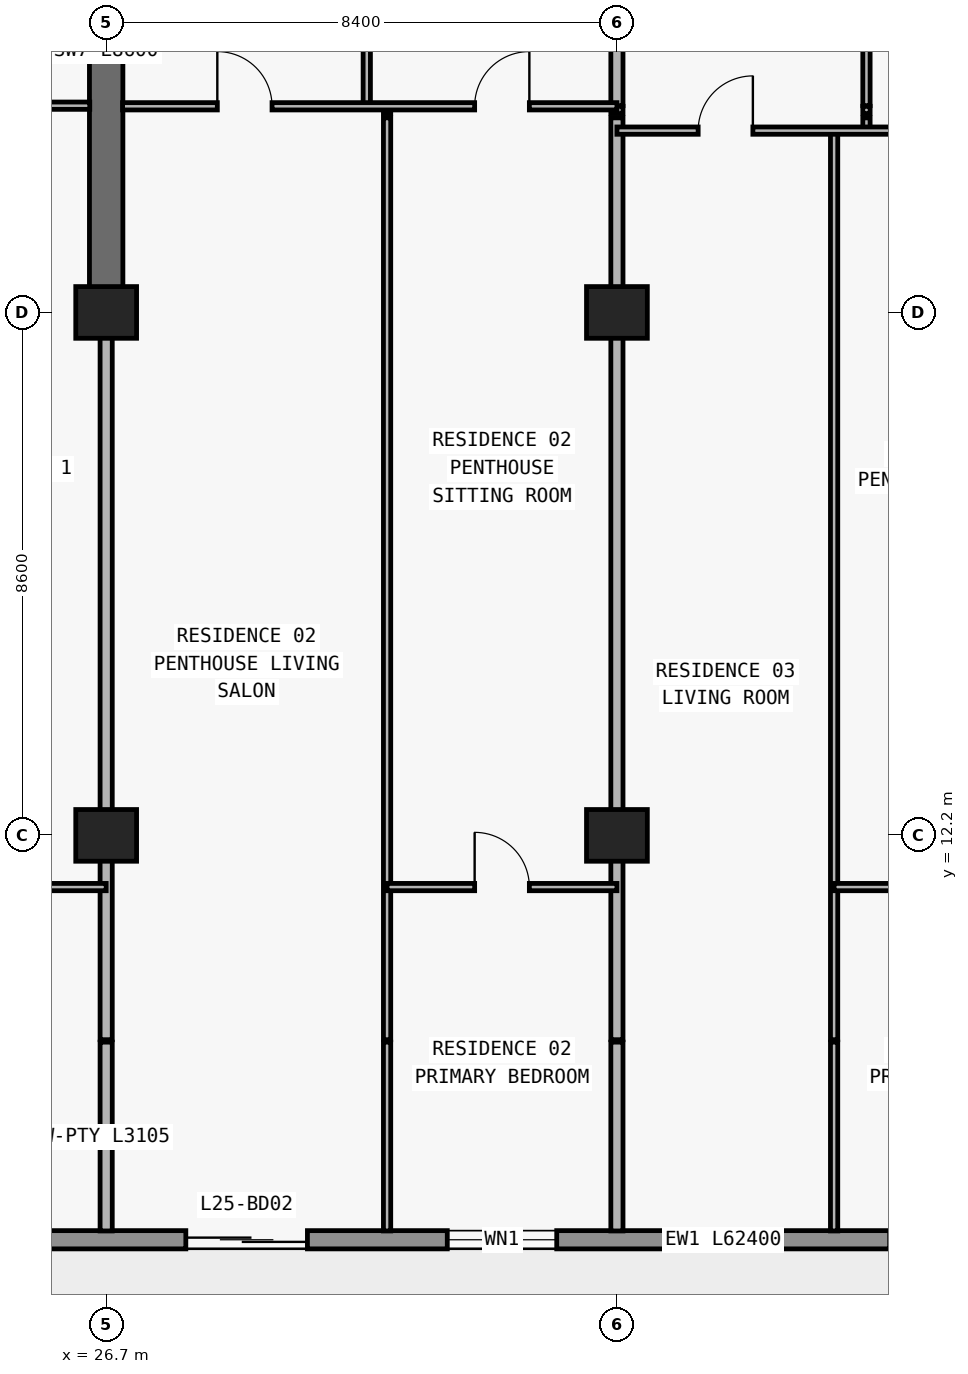
"""IFC4 building model, lengths in metres.
Left out: names, types, materials, properties, quantities, classifications, styles, units other than length and angle.
Written with IfcOpenShell. Run it as: python <this file> out.ifc"""

import sys

from ifc_helpers import new_model, si_unit, direction, frame, frame_2d, origin, origin_2d, place, context, subcontext, project, spatial, rectangle, extrude, element, fill, save


model = new_model("IFC4")
c1 = context("Model", 3, precision=1e-05, world=origin(), true_north=direction((0.0, 1.0)))
c2 = subcontext(c1, "Body", "Model", "MODEL_VIEW")
j1 = project(units=[si_unit("LENGTHUNIT", "METRE"), si_unit("PLANEANGLEUNIT", "RADIAN")], contexts=[c1])
p1 = place(None, origin())
s1 = spatial("IfcSite", under=j1, at=p1, CompositionType="ELEMENT")
p2 = place(p1, origin())
s2 = spatial("IfcBuilding", under=s1, at=p2, CompositionType="ELEMENT")
p3 = place(p2, frame((0.0, 0.0, 94.5)))
s3 = spatial("IfcBuildingStorey", under=s2, at=p3, CompositionType="ELEMENT", Elevation=94.5)
for number, where, z_axis, x_axis in (
    (1, (26.7, 12.2, 0.0), (0.0, 0.0, 1.0), (1.0, 0.0, 0.0)),
    (2, (35.1, 12.2, 0.0), (0.0, 0.0, 1.0), (1.0, 0.0, 0.0)),
    (3, (26.7, 20.8, 0.0), (0.0, 0.0, 1.0), (1.0, 0.0, 0.0)),
    (4, (35.1, 20.8, 0.0), (0.0, 0.0, 1.0), (1.0, 0.0, 0.0)),
):
    element("IfcColumn", number, at=place(p3, frame(where, z_axis=z_axis, x_axis=x_axis)), inside=s3, PredefinedType="COLUMN", context=c2, shape_type="SweptSolid", body=[
        extrude(rectangle(XDim=1.0, YDim=0.85, at=origin_2d()), origin(), (0.0, 0.0, 1.0), 3.0),
    ])
p4 = place(p3, frame((26.7, 20.8, 0.0), z_axis=(0.0, 0.0, 1.0), x_axis=(0.0, 1.0, 0.0)))
e5 = element("IfcWall", 5, at=p4, inside=s3, PredefinedType="SHEAR", context=c2, shape_type="SweptSolid", body=[
    extrude(rectangle(XDim=8.6, YDim=0.55, at=frame_2d((4.3, 0.0))), origin(), (0.0, 0.0, 1.0), 3.0),
])
p5 = place(p3, frame((70.1, 5.55, 0.0), z_axis=(0.0, 0.0, 1.0), x_axis=(-1.0, 0.0, 0.0)))
e6 = element("IfcWall", 6, at=p5, inside=s3, PredefinedType="STANDARD", context=c2, shape_type="SweptSolid", body=[
    extrude(rectangle(XDim=62.4, YDim=0.3, at=frame_2d((31.2, 0.0))), origin(), (0.0, 0.0, 1.0), 3.0),
])
p6 = place(p5, frame((57.29, 0.0, 0.0)))
e7 = element("IfcOpeningElement", 7, at=p6, cuts=e6, PredefinedType="OPENING", context=c2, shape_type="SweptSolid", body=[
    extrude(rectangle(XDim=2.0, YDim=2.3, at=frame_2d((1.0, 1.15))), frame((0.0, 0.16, 0.0), z_axis=(0.0, -1.0, 0.0), x_axis=(1.0, 0.0, 0.0)), (0.0, 0.0, 1.0), 0.32),
])
p7 = place(p5, frame((52.61, 0.0, 0.65)))
e8 = element("IfcOpeningElement", 8, at=p7, cuts=e6, PredefinedType="OPENING", context=c2, shape_type="SweptSolid", body=[
    extrude(rectangle(XDim=2.6, YDim=1.85, at=frame_2d((1.3, 0.925))), frame((0.0, 0.16, 0.0), z_axis=(0.0, -1.0, 0.0), x_axis=(1.0, 0.0, 0.0)), (0.0, 0.0, 1.0), 0.32),
])
p8 = place(p5, frame((46.5, 0.0, 0.85)))
e9 = element("IfcOpeningElement", 9, at=p8, cuts=e6, PredefinedType="OPENING", context=c2, shape_type="SweptSolid", body=[
    extrude(rectangle(XDim=2.2, YDim=1.55, at=frame_2d((1.1, 0.775))), frame((0.0, 0.16, 0.0), z_axis=(0.0, -1.0, 0.0), x_axis=(1.0, 0.0, 0.0)), (0.0, 0.0, 1.0), 0.32),
])
p9 = place(p5, frame((40.09, 0.0, 0.0)))
e10 = element("IfcOpeningElement", 10, at=p9, cuts=e6, PredefinedType="OPENING", context=c2, shape_type="SweptSolid", body=[
    extrude(rectangle(XDim=2.0, YDim=2.3, at=frame_2d((1.0, 1.15))), frame((0.0, 0.16, 0.0), z_axis=(0.0, -1.0, 0.0), x_axis=(1.0, 0.0, 0.0)), (0.0, 0.0, 1.0), 0.32),
])
p10 = place(p5, frame((35.99, 0.0, 0.85)))
e11 = element("IfcOpeningElement", 11, at=p10, cuts=e6, PredefinedType="OPENING", context=c2, shape_type="SweptSolid", body=[
    extrude(rectangle(XDim=1.8, YDim=1.55, at=frame_2d((0.9, 0.775))), frame((0.0, 0.16, 0.0), z_axis=(0.0, -1.0, 0.0), x_axis=(1.0, 0.0, 0.0)), (0.0, 0.0, 1.0), 0.32),
])
p11 = place(p5, frame((28.314, 0.0, 0.85)))
e12 = element("IfcOpeningElement", 12, at=p11, cuts=e6, PredefinedType="OPENING", context=c2, shape_type="SweptSolid", body=[
    extrude(rectangle(XDim=2.2, YDim=1.55, at=frame_2d((1.1, 0.775))), frame((0.0, 0.16, 0.0), z_axis=(0.0, -1.0, 0.0), x_axis=(1.0, 0.0, 0.0)), (0.0, 0.0, 1.0), 0.32),
])
p12 = place(p5, frame((24.09, 0.0, 0.0)))
e13 = element("IfcOpeningElement", 13, at=p12, cuts=e6, PredefinedType="OPENING", context=c2, shape_type="SweptSolid", body=[
    extrude(rectangle(XDim=2.0, YDim=2.3, at=frame_2d((1.0, 1.15))), frame((0.0, 0.16, 0.0), z_axis=(0.0, -1.0, 0.0), x_axis=(1.0, 0.0, 0.0)), (0.0, 0.0, 1.0), 0.32),
])
p13 = place(p5, frame((19.99, 0.0, 0.85)))
e14 = element("IfcOpeningElement", 14, at=p13, cuts=e6, PredefinedType="OPENING", context=c2, shape_type="SweptSolid", body=[
    extrude(rectangle(XDim=1.8, YDim=1.55, at=frame_2d((0.9, 0.775))), frame((0.0, 0.16, 0.0), z_axis=(0.0, -1.0, 0.0), x_axis=(1.0, 0.0, 0.0)), (0.0, 0.0, 1.0), 0.32),
])
p14 = place(p5, frame((16.09, 0.0, 0.0)))
e15 = element("IfcOpeningElement", 15, at=p14, cuts=e6, PredefinedType="OPENING", context=c2, shape_type="SweptSolid", body=[
    extrude(rectangle(XDim=2.0, YDim=2.3, at=frame_2d((1.0, 1.15))), frame((0.0, 0.16, 0.0), z_axis=(0.0, -1.0, 0.0), x_axis=(1.0, 0.0, 0.0)), (0.0, 0.0, 1.0), 0.32),
])
p15 = place(p5, frame((11.41, 0.0, 0.65)))
e16 = element("IfcOpeningElement", 16, at=p15, cuts=e6, PredefinedType="OPENING", context=c2, shape_type="SweptSolid", body=[
    extrude(rectangle(XDim=2.6, YDim=1.85, at=frame_2d((1.3, 0.925))), frame((0.0, 0.16, 0.0), z_axis=(0.0, -1.0, 0.0), x_axis=(1.0, 0.0, 0.0)), (0.0, 0.0, 1.0), 0.32),
])
p16 = place(p5, frame((5.3, 0.0, 0.85)))
e17 = element("IfcOpeningElement", 17, at=p16, cuts=e6, PredefinedType="OPENING", context=c2, shape_type="SweptSolid", body=[
    extrude(rectangle(XDim=2.2, YDim=1.55, at=frame_2d((1.1, 0.775))), frame((0.0, 0.16, 0.0), z_axis=(0.0, -1.0, 0.0), x_axis=(1.0, 0.0, 0.0)), (0.0, 0.0, 1.0), 0.32),
])
p17 = place(p3, frame((26.7, 5.695, 0.0), z_axis=(0.0, 0.0, 1.0), x_axis=(0.0, 1.0, 0.0)))
e18 = element("IfcWall", 18, at=p17, inside=s3, PredefinedType="PARTITIONING", context=c2, shape_type="SweptSolid", body=[
    extrude(rectangle(XDim=3.105, YDim=0.2, at=frame_2d((1.552, 0.0))), origin(), (0.0, 0.0, 1.0), 3.0),
])
p18 = place(p3, frame((26.7, 8.84, 0.0), z_axis=(0.0, 0.0, 1.0), x_axis=(0.0, 1.0, 0.0)))
e19 = element("IfcWall", 19, at=p18, inside=s3, PredefinedType="PARTITIONING", context=c2, shape_type="SweptSolid", body=[
    extrude(rectangle(XDim=11.955, YDim=0.2, at=frame_2d((5.978, 0.0))), origin(), (0.0, 0.0, 1.0), 2.124),
])
p19 = place(p3, frame((30.986, 24.2, 0.0), z_axis=(0.0, 0.0, 1.0), x_axis=(0.0, 1.0, 0.0)))
e20 = element("IfcWall", 20, at=p19, inside=s3, PredefinedType="PARTITIONING", context=c2, shape_type="SweptSolid", body=[
    extrude(rectangle(XDim=5.14, YDim=0.12, at=frame_2d((2.57, 0.0))), origin(), (0.0, 0.0, 1.0), 2.436),
])
p20 = place(p19, frame((2.12, 0.0, 0.0)))
e21 = element("IfcOpeningElement", 21, at=p20, cuts=e20, PredefinedType="OPENING", context=c2, shape_type="SweptSolid", body=[
    extrude(rectangle(XDim=0.9, YDim=2.15, at=frame_2d((0.45, 1.075))), frame((0.0, 0.07, 0.0), z_axis=(0.0, -1.0, 0.0), x_axis=(1.0, 0.0, 0.0)), (0.0, 0.0, 1.0), 0.14),
])
p21 = place(p3, frame((31.32, 5.695, 0.0), z_axis=(0.0, 0.0, 1.0), x_axis=(0.0, 1.0, 0.0)))
e22 = element("IfcWall", 22, at=p21, inside=s3, PredefinedType="PARTITIONING", context=c2, shape_type="SweptSolid", body=[
    extrude(rectangle(XDim=3.105, YDim=0.12, at=frame_2d((1.552, 0.0))), origin(), (0.0, 0.0, 1.0), 3.0),
])
p22 = place(p3, frame((31.32, 8.84, 0.0), z_axis=(0.0, 0.0, 1.0), x_axis=(0.0, 1.0, 0.0)))
e23 = element("IfcWall", 23, at=p22, inside=s3, PredefinedType="PARTITIONING", context=c2, shape_type="SweptSolid", body=[
    extrude(rectangle(XDim=15.16, YDim=0.12, at=frame_2d((7.58, 0.0))), origin(), (0.0, 0.0, 1.0), 3.0),
])
p23 = place(p3, frame((31.32, 24.07, 0.0), z_axis=(0.0, 0.0, 1.0), x_axis=(0.0, 1.0, 0.0)))
e24 = element("IfcWall", 24, at=p23, inside=s3, PredefinedType="PARTITIONING", context=c2, shape_type="SweptSolid", body=[
    extrude(rectangle(XDim=0.12, YDim=0.12, at=frame_2d((0.06, 0.0))), origin(), (0.0, 0.0, 1.0), 3.0),
])
p24 = place(p3, frame((35.1, 5.695, 0.0), z_axis=(0.0, 0.0, 1.0), x_axis=(0.0, 1.0, 0.0)))
e25 = element("IfcWall", 25, at=p24, inside=s3, PredefinedType="PARTITIONING", context=c2, shape_type="SweptSolid", body=[
    extrude(rectangle(XDim=3.105, YDim=0.2, at=frame_2d((1.552, 0.0))), origin(), (0.0, 0.0, 1.0), 3.0),
])
p25 = place(p3, frame((35.1, 8.84, 0.0), z_axis=(0.0, 0.0, 1.0), x_axis=(0.0, 1.0, 0.0)))
e26 = element("IfcWall", 26, at=p25, inside=s3, PredefinedType="PARTITIONING", context=c2, shape_type="SweptSolid", body=[
    extrude(rectangle(XDim=15.16, YDim=0.2, at=frame_2d((7.58, 0.0))), origin(), (0.0, 0.0, 1.0), 2.124),
])
p26 = place(p3, frame((35.1, 24.07, 0.0), z_axis=(0.0, 0.0, 1.0), x_axis=(0.0, 1.0, 0.0)))
e27 = element("IfcWall", 27, at=p26, inside=s3, PredefinedType="PARTITIONING", context=c2, shape_type="SweptSolid", body=[
    extrude(rectangle(XDim=0.12, YDim=0.2, at=frame_2d((0.06, 0.0))), origin(), (0.0, 0.0, 1.0), 2.124),
])
p27 = place(p3, frame((35.1, 24.2, 0.0), z_axis=(0.0, 0.0, 1.0), x_axis=(0.0, 1.0, 0.0)))
e28 = element("IfcWall", 28, at=p27, inside=s3, PredefinedType="PARTITIONING", context=c2, shape_type="SweptSolid", body=[
    extrude(rectangle(XDim=5.14, YDim=0.2, at=frame_2d((2.57, 0.0))), origin(), (0.0, 0.0, 1.0), 2.124),
])
p28 = place(p3, frame((38.672, 5.695, 0.0), z_axis=(0.0, 0.0, 1.0), x_axis=(0.0, 1.0, 0.0)))
e29 = element("IfcWall", 29, at=p28, inside=s3, PredefinedType="PARTITIONING", context=c2, shape_type="SweptSolid", body=[
    extrude(rectangle(XDim=3.105, YDim=0.12, at=frame_2d((1.552, 0.0))), origin(), (0.0, 0.0, 1.0), 3.0),
])
p29 = place(p3, frame((38.672, 8.84, 0.0), z_axis=(0.0, 0.0, 1.0), x_axis=(0.0, 1.0, 0.0)))
e30 = element("IfcWall", 30, at=p29, inside=s3, PredefinedType="PARTITIONING", context=c2, shape_type="SweptSolid", body=[
    extrude(rectangle(XDim=14.95, YDim=0.12, at=frame_2d((7.475, 0.0))), origin(), (0.0, 0.0, 1.0), 2.436),
])
p30 = place(p3, frame((39.204, 23.79, 0.0), z_axis=(0.0, 0.0, 1.0), x_axis=(0.0, 1.0, 0.0)))
e31 = element("IfcWall", 31, at=p30, inside=s3, PredefinedType="PARTITIONING", context=c2, shape_type="SweptSolid", body=[
    extrude(rectangle(XDim=0.21, YDim=0.12, at=frame_2d((0.105, 0.0))), origin(), (0.0, 0.0, 1.0), 3.0),
])
p31 = place(p3, frame((39.204, 24.07, 0.0), z_axis=(0.0, 0.0, 1.0), x_axis=(0.0, 1.0, 0.0)))
e32 = element("IfcWall", 32, at=p31, inside=s3, PredefinedType="PARTITIONING", context=c2, shape_type="SweptSolid", body=[
    extrude(rectangle(XDim=0.12, YDim=0.12, at=frame_2d((0.06, 0.0))), origin(), (0.0, 0.0, 1.0), 3.0),
])
p32 = place(p3, frame((39.204, 24.2, 0.0), z_axis=(0.0, 0.0, 1.0), x_axis=(0.0, 1.0, 0.0)))
e33 = element("IfcWall", 33, at=p32, inside=s3, PredefinedType="PARTITIONING", context=c2, shape_type="SweptSolid", body=[
    extrude(rectangle(XDim=4.74, YDim=0.12, at=frame_2d((2.37, 0.0))), origin(), (0.0, 0.0, 1.0), 3.0),
])
p33 = place(p32, frame((1.92, 0.0, 0.0)))
e34 = element("IfcOpeningElement", 34, at=p33, cuts=e33, PredefinedType="OPENING", context=c2, shape_type="SweptSolid", body=[
    extrude(rectangle(XDim=0.9, YDim=2.15, at=frame_2d((0.45, 1.075))), frame((0.0, 0.07, 0.0), z_axis=(0.0, -1.0, 0.0), x_axis=(1.0, 0.0, 0.0)), (0.0, 0.0, 1.0), 0.14),
])
p34 = place(p3, frame((18.3, 11.35, 0.0), z_axis=(0.0, 0.0, 1.0), x_axis=(1.0, 0.0, 0.0)))
e35 = element("IfcWall", 35, at=p34, inside=s3, PredefinedType="PARTITIONING", context=c2, shape_type="SweptSolid", body=[
    extrude(rectangle(XDim=8.4, YDim=0.12, at=frame_2d((4.2, 0.0))), origin(), (0.0, 0.0, 1.0), 3.0),
])
p35 = place(p34, frame((3.75, 0.0, 0.0)))
e36 = element("IfcOpeningElement", 36, at=p35, cuts=e35, PredefinedType="OPENING", context=c2, shape_type="SweptSolid", body=[
    extrude(rectangle(XDim=0.9, YDim=2.15, at=frame_2d((0.45, 1.075))), frame((0.0, 0.07, 0.0), z_axis=(0.0, -1.0, 0.0), x_axis=(1.0, 0.0, 0.0)), (0.0, 0.0, 1.0), 0.14),
])
p36 = place(p3, frame((31.32, 11.35, 0.0), z_axis=(0.0, 0.0, 1.0), x_axis=(1.0, 0.0, 0.0)))
e37 = element("IfcWall", 37, at=p36, inside=s3, PredefinedType="PARTITIONING", context=c2, shape_type="SweptSolid", body=[
    extrude(rectangle(XDim=3.78, YDim=0.12, at=frame_2d((1.89, 0.0))), origin(), (0.0, 0.0, 1.0), 3.0),
])
p37 = place(p36, frame((1.44, 0.0, 0.0)))
e38 = element("IfcOpeningElement", 38, at=p37, cuts=e37, PredefinedType="OPENING", context=c2, shape_type="SweptSolid", body=[
    extrude(rectangle(XDim=0.9, YDim=2.15, at=frame_2d((0.45, 1.075))), frame((0.0, 0.07, 0.0), z_axis=(0.0, -1.0, 0.0), x_axis=(1.0, 0.0, 0.0)), (0.0, 0.0, 1.0), 0.14),
])
p38 = place(p3, frame((38.672, 11.35, 0.0), z_axis=(0.0, 0.0, 1.0), x_axis=(1.0, 0.0, 0.0)))
e39 = element("IfcWall", 39, at=p38, inside=s3, PredefinedType="PARTITIONING", context=c2, shape_type="SweptSolid", body=[
    extrude(rectangle(XDim=4.028, YDim=0.12, at=frame_2d((2.014, 0.0))), origin(), (0.0, 0.0, 1.0), 3.0),
])
p39 = place(p38, frame((1.564, 0.0, 0.0)))
e40 = element("IfcOpeningElement", 40, at=p39, cuts=e39, PredefinedType="OPENING", context=c2, shape_type="SweptSolid", body=[
    extrude(rectangle(XDim=0.9, YDim=2.15, at=frame_2d((0.45, 1.075))), frame((0.0, 0.07, 0.0), z_axis=(0.0, -1.0, 0.0), x_axis=(1.0, 0.0, 0.0)), (0.0, 0.0, 1.0), 0.14),
])
p40 = place(p3, frame((35.1, 23.79, 0.0), z_axis=(0.0, 0.0, 1.0), x_axis=(1.0, 0.0, 0.0)))
e41 = element("IfcWall", 41, at=p40, inside=s3, PredefinedType="PARTITIONING", context=c2, shape_type="SweptSolid", body=[
    extrude(rectangle(XDim=7.6, YDim=0.12, at=frame_2d((3.8, 0.0))), origin(), (0.0, 0.0, 1.0), 3.0),
])
p41 = place(p40, frame((1.336, 0.0, 0.0)))
e42 = element("IfcOpeningElement", 42, at=p41, cuts=e41, PredefinedType="OPENING", context=c2, shape_type="SweptSolid", body=[
    extrude(rectangle(XDim=0.9, YDim=2.15, at=frame_2d((0.45, 1.075))), frame((0.0, 0.07, 0.0), z_axis=(0.0, -1.0, 0.0), x_axis=(1.0, 0.0, 0.0)), (0.0, 0.0, 1.0), 0.14),
])
p42 = place(p40, frame((5.402, 0.0, 0.0)))
e43 = element("IfcOpeningElement", 43, at=p42, cuts=e41, PredefinedType="OPENING", context=c2, shape_type="SweptSolid", body=[
    extrude(rectangle(XDim=0.9, YDim=2.15, at=frame_2d((0.45, 1.075))), frame((0.0, 0.07, 0.0), z_axis=(0.0, -1.0, 0.0), x_axis=(1.0, 0.0, 0.0)), (0.0, 0.0, 1.0), 0.14),
])
p43 = place(p3, frame((26.97, 24.19, 0.0), z_axis=(0.0, 0.0, 1.0), x_axis=(1.0, 0.0, 0.0)))
e44 = element("IfcWall", 44, at=p43, inside=s3, PredefinedType="PARTITIONING", context=c2, shape_type="SweptSolid", body=[
    extrude(rectangle(XDim=8.13, YDim=0.12, at=frame_2d((4.065, 0.0))), origin(), (0.0, 0.0, 1.0), 3.0),
])
p44 = place(p43, frame((1.558, 0.0, 0.0)))
e45 = element("IfcOpeningElement", 45, at=p44, cuts=e44, PredefinedType="OPENING", context=c2, shape_type="SweptSolid", body=[
    extrude(rectangle(XDim=0.9, YDim=2.15, at=frame_2d((0.45, 1.075))), frame((0.0, 0.07, 0.0), z_axis=(0.0, -1.0, 0.0), x_axis=(1.0, 0.0, 0.0)), (0.0, 0.0, 1.0), 0.14),
])
p45 = place(p43, frame((5.79, 0.0, 0.0)))
e46 = element("IfcOpeningElement", 46, at=p45, cuts=e44, PredefinedType="OPENING", context=c2, shape_type="SweptSolid", body=[
    extrude(rectangle(XDim=0.9, YDim=2.15, at=frame_2d((0.45, 1.075))), frame((0.0, 0.07, 0.0), z_axis=(0.0, -1.0, 0.0), x_axis=(1.0, 0.0, 0.0)), (0.0, 0.0, 1.0), 0.14),
])
p46 = place(p3, frame((18.3, 24.2, 0.0), z_axis=(0.0, 0.0, 1.0), x_axis=(1.0, 0.0, 0.0)))
e47 = element("IfcWall", 47, at=p46, inside=s3, PredefinedType="PARTITIONING", context=c2, shape_type="SweptSolid", body=[
    extrude(rectangle(XDim=8.13, YDim=0.12, at=frame_2d((4.065, 0.0))), origin(), (0.0, 0.0, 1.0), 3.0),
])
p47 = place(p46, frame((3.615, 0.0, 0.0)))
e48 = element("IfcOpeningElement", 48, at=p47, cuts=e47, PredefinedType="OPENING", context=c2, shape_type="SweptSolid", body=[
    extrude(rectangle(XDim=0.9, YDim=2.15, at=frame_2d((0.45, 1.075))), frame((0.0, 0.07, 0.0), z_axis=(0.0, -1.0, 0.0), x_axis=(1.0, 0.0, 0.0)), (0.0, 0.0, 1.0), 0.14),
])
p48 = place(p9, origin())
e49 = element("IfcDoor", 49, at=p48, inside=s3, OperationType="DOUBLE_DOOR_SLIDING", PredefinedType="DOOR", context=c2, shape_type="SweptSolid", body=[
    extrude(rectangle(XDim=2.0, YDim=2.3, at=frame_2d((1.0, 1.15))), frame((0.0, 0.025, 0.0), z_axis=(0.0, -1.0, 0.0), x_axis=(1.0, 0.0, 0.0)), (0.0, 0.0, 1.0), 0.05),
])
fill(e10, e49)
p49 = place(p10, origin())
e50 = element("IfcWindow", 50, at=p49, inside=s3, PartitioningType="SINGLE_PANEL", PredefinedType="WINDOW", context=c2, shape_type="SweptSolid", body=[
    extrude(rectangle(XDim=1.8, YDim=1.55, at=frame_2d((0.9, 0.775))), frame((0.0, 0.03, 0.0), z_axis=(0.0, -1.0, 0.0), x_axis=(1.0, 0.0, 0.0)), (0.0, 0.0, 1.0), 0.06),
])
fill(e11, e50)
p50 = place(p44, origin())
e51 = element("IfcDoor", 51, at=p50, inside=s3, OperationType="SINGLE_SWING_LEFT", PredefinedType="DOOR", context=c2, shape_type="SweptSolid", body=[
    extrude(rectangle(XDim=0.9, YDim=2.15, at=frame_2d((0.45, 1.075))), frame((0.0, 0.025, 0.0), z_axis=(0.0, -1.0, 0.0), x_axis=(1.0, 0.0, 0.0)), (0.0, 0.0, 1.0), 0.05),
])
fill(e45, e51)
p51 = place(p45, origin())
e52 = element("IfcDoor", 52, at=p51, inside=s3, OperationType="SINGLE_SWING_RIGHT", PredefinedType="DOOR", context=c2, shape_type="SweptSolid", body=[
    extrude(rectangle(XDim=0.9, YDim=2.15, at=frame_2d((0.45, 1.075))), frame((0.0, 0.025, 0.0), z_axis=(0.0, -1.0, 0.0), x_axis=(1.0, 0.0, 0.0)), (0.0, 0.0, 1.0), 0.05),
])
fill(e46, e52)
p52 = place(p37, origin())
e53 = element("IfcDoor", 53, at=p52, inside=s3, OperationType="SINGLE_SWING_LEFT", PredefinedType="DOOR", context=c2, shape_type="SweptSolid", body=[
    extrude(rectangle(XDim=0.9, YDim=2.15, at=frame_2d((0.45, 1.075))), frame((0.0, 0.025, 0.0), z_axis=(0.0, -1.0, 0.0), x_axis=(1.0, 0.0, 0.0)), (0.0, 0.0, 1.0), 0.05),
])
fill(e38, e53)
p53 = place(p41, origin())
e54 = element("IfcDoor", 54, at=p53, inside=s3, OperationType="SINGLE_SWING_RIGHT", PredefinedType="DOOR", context=c2, shape_type="SweptSolid", body=[
    extrude(rectangle(XDim=0.9, YDim=2.15, at=frame_2d((0.45, 1.075))), frame((0.0, 0.025, 0.0), z_axis=(0.0, -1.0, 0.0), x_axis=(1.0, 0.0, 0.0)), (0.0, 0.0, 1.0), 0.05),
])
fill(e42, e54)
save(model, sys.argv[1])
